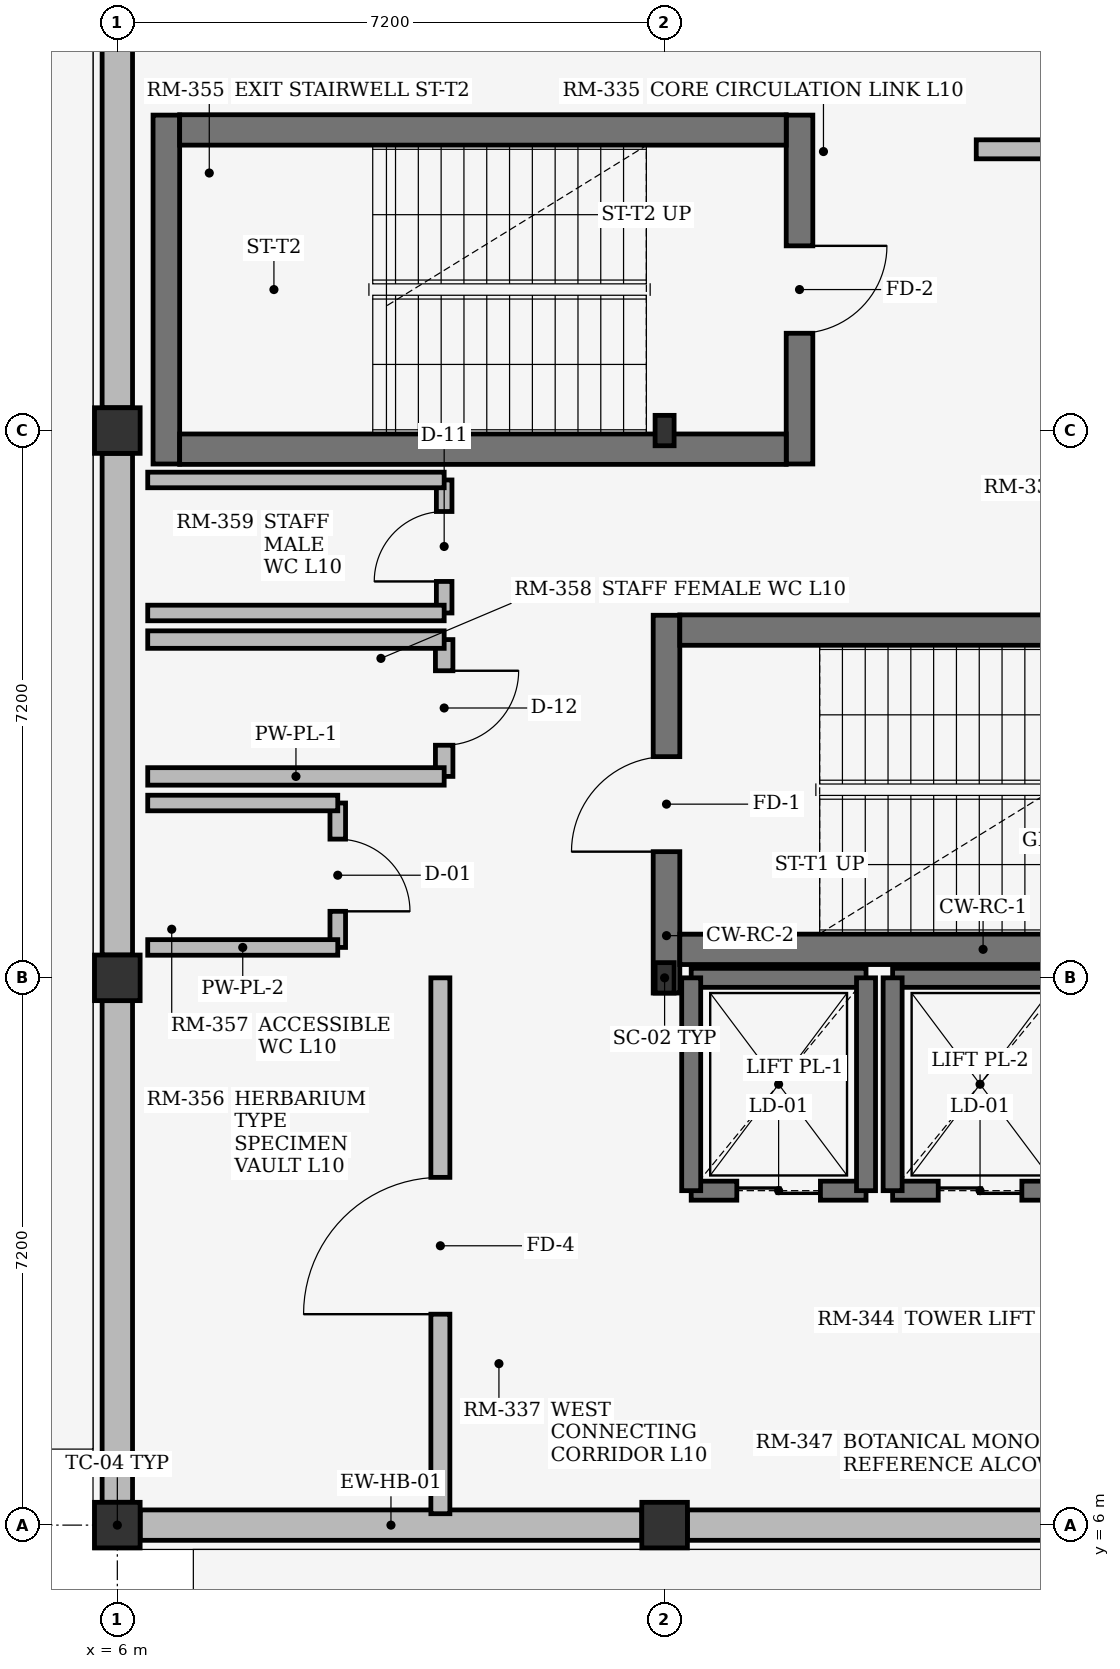
"""IFC4 building model, lengths in metres.
Left out: names, types, materials, properties, quantities, classifications, styles, units other than length and angle.
Written with IfcOpenShell. Run it as: python <this file> out.ifc"""

import sys

from ifc_helpers import new_model, si_unit, direction, frame, frame_2d, origin, origin_2d, place, context, subcontext, project, spatial, rectangle, i_section, extrude, element, fill, save


model = new_model("IFC4")
c1 = context("Model", 3, precision=1e-05, world=origin(), true_north=direction((0.0, 1.0)))
c2 = subcontext(c1, "Body", "Model", "MODEL_VIEW")
j1 = project(units=[si_unit("LENGTHUNIT", "METRE"), si_unit("PLANEANGLEUNIT", "RADIAN")], contexts=[c1])
p1 = place(None, origin())
s1 = spatial("IfcSite", under=j1, at=p1, CompositionType="ELEMENT")
p2 = place(p1, origin())
s2 = spatial("IfcBuilding", under=s1, at=p2, CompositionType="ELEMENT")
p3 = place(p2, frame((0.0, 0.0, 40.5)))
s3 = spatial("IfcBuildingStorey", under=s2, at=p3, CompositionType="ELEMENT", Elevation=40.5)
for number, where, z_axis, x_axis in (
    (1, (6.0, 6.0, 0.0), (0.0, 0.0, 1.0), (1.0, 0.0, 0.0)),
    (2, (6.0, 13.2, 0.0), (0.0, 0.0, 1.0), (1.0, 0.0, 0.0)),
    (3, (6.0, 20.4, 0.0), (0.0, 0.0, 1.0), (1.0, 0.0, 0.0)),
    (4, (13.2, 6.0, 0.0), (0.0, 0.0, 1.0), (1.0, 0.0, 0.0)),
):
    element("IfcColumn", number, at=place(p3, frame(where, z_axis=z_axis, x_axis=x_axis)), inside=s3, PredefinedType="COLUMN", context=c2, shape_type="SweptSolid", body=[
        extrude(rectangle(XDim=0.6, YDim=0.6, at=origin_2d()), origin(), (0.0, 0.0, 1.0), 3.68),
    ])
for number, where, z_axis, x_axis in (
    (5, (13.2, 13.2, 0.0), (0.0, 0.0, 1.0), (1.0, 0.0, 0.0)),
    (6, (13.2, 20.4, 0.0), (0.0, 0.0, 1.0), (1.0, 0.0, 0.0)),
):
    element("IfcColumn", number, at=place(p3, frame(where, z_axis=z_axis, x_axis=x_axis)), inside=s3, PredefinedType="COLUMN", context=c2, shape_type="SweptSolid", body=[
        extrude(i_section(OverallWidth=0.25, OverallDepth=0.4, WebThickness=0.01, FlangeThickness=0.013, at=origin_2d()), origin(), (0.0, 0.0, 1.0), 3.68),
    ])
p4 = place(p3, frame((6.3, 6.0, 0.0), z_axis=(0.0, 0.0, 1.0), x_axis=(1.0, 0.0, 0.0)))
e7 = element("IfcWall", 7, at=p4, inside=s3, PredefinedType="STANDARD", context=c2, shape_type="SweptSolid", body=[
    extrude(rectangle(XDim=6.6, YDim=0.4, at=frame_2d((3.3, 0.0))), origin(), (0.0, 0.0, 1.0), 3.16),
])
p5 = place(p3, frame((13.5, 6.0, 0.0), z_axis=(0.0, 0.0, 1.0), x_axis=(1.0, 0.0, 0.0)))
e8 = element("IfcWall", 8, at=p5, inside=s3, PredefinedType="STANDARD", context=c2, shape_type="SweptSolid", body=[
    extrude(rectangle(XDim=6.6, YDim=0.4, at=frame_2d((3.3, 0.0))), origin(), (0.0, 0.0, 1.0), 3.16),
])
p6 = place(p3, frame((6.0, 6.3, 0.0), z_axis=(0.0, 0.0, 1.0), x_axis=(0.0, 1.0, 0.0)))
e9 = element("IfcWall", 9, at=p6, inside=s3, PredefinedType="STANDARD", context=c2, shape_type="SweptSolid", body=[
    extrude(rectangle(XDim=6.6, YDim=0.4, at=frame_2d((3.3, 0.0))), origin(), (0.0, 0.0, 1.0), 3.16),
])
for number, where, z_axis, x_axis in (
    (10, (6.0, 13.5, 0.0), (0.0, 0.0, 1.0), (0.0, 1.0, 0.0)),
    (11, (6.0, 20.7, 0.0), (0.0, 0.0, 1.0), (0.0, 1.0, 0.0)),
):
    element("IfcWall", number, at=place(p3, frame(where, z_axis=z_axis, x_axis=x_axis)), inside=s3, PredefinedType="STANDARD", context=c2, shape_type="SweptSolid", body=[
        extrude(rectangle(XDim=6.6, YDim=0.4, at=frame_2d((3.3, 0.0))), origin(), (0.0, 0.0, 1.0), 3.16),
    ])
p7 = place(p3, frame((13.225, 13.0, 0.0), z_axis=(0.0, 0.0, 1.0), x_axis=(0.0, 1.0, 0.0)))
e12 = element("IfcWall", 12, at=p7, inside=s3, PredefinedType="SHEAR", context=c2, shape_type="SweptSolid", body=[
    extrude(rectangle(XDim=4.97, YDim=0.35, at=frame_2d((2.485, 0.0))), origin(), (0.0, 0.0, 1.0), 3.68),
])
p8 = place(p7, frame((1.86, 0.0, 0.0)))
e13 = element("IfcOpeningElement", 13, at=p8, cuts=e12, PredefinedType="OPENING", context=c2, shape_type="SweptSolid", body=[
    extrude(rectangle(XDim=1.25, YDim=2.2, at=frame_2d((0.625, 1.1))), frame((0.0, 0.185, 0.0), z_axis=(0.0, -1.0, 0.0), x_axis=(1.0, 0.0, 0.0)), (0.0, 0.0, 1.0), 0.37),
])
for number, where, z_axis, x_axis in (
    (14, (13.4, 13.575, 0.0), (0.0, 0.0, 1.0), (1.0, 0.0, 0.0)),
    (15, (13.4, 17.775, 0.0), (0.0, 0.0, 1.0), (1.0, 0.0, 0.0)),
):
    element("IfcWall", number, at=place(p3, frame(where, z_axis=z_axis, x_axis=x_axis)), inside=s3, PredefinedType="SHEAR", context=c2, shape_type="SweptSolid", body=[
        extrude(rectangle(XDim=7.98, YDim=0.4, at=frame_2d((3.99, 0.0))), origin(), (0.0, 0.0, 1.0), 3.68),
    ])
p9 = place(p3, frame((14.975, 24.55, 0.0), z_axis=(0.0, 0.0, 1.0), x_axis=(0.0, -1.0, 0.0)))
e16 = element("IfcWall", 16, at=p9, inside=s3, PredefinedType="SHEAR", context=c2, shape_type="SweptSolid", body=[
    extrude(rectangle(XDim=4.59, YDim=0.35, at=frame_2d((2.295, 0.0))), origin(), (0.0, 0.0, 1.0), 3.68),
])
p10 = place(p9, frame((1.72, 0.0, 0.0)))
e17 = element("IfcOpeningElement", 17, at=p10, cuts=e16, PredefinedType="OPENING", context=c2, shape_type="SweptSolid", body=[
    extrude(rectangle(XDim=1.15, YDim=2.2, at=frame_2d((0.575, 1.1))), frame((0.0, 0.185, 0.0), z_axis=(0.0, -1.0, 0.0), x_axis=(1.0, 0.0, 0.0)), (0.0, 0.0, 1.0), 0.37),
])
p11 = place(p3, frame((6.645, 24.55, 0.0), z_axis=(0.0, 0.0, 1.0), x_axis=(0.0, -1.0, 0.0)))
e18 = element("IfcWall", 18, at=p11, inside=s3, PredefinedType="SHEAR", context=c2, shape_type="SweptSolid", body=[
    extrude(rectangle(XDim=4.59, YDim=0.35, at=frame_2d((2.295, 0.0))), origin(), (0.0, 0.0, 1.0), 3.68),
])
for number, where, z_axis, x_axis in (
    (19, (14.8, 24.355, 0.0), (0.0, 0.0, 1.0), (-1.0, 0.0, 0.0)),
    (20, (14.8, 20.155, 0.0), (0.0, 0.0, 1.0), (-1.0, 0.0, 0.0)),
):
    element("IfcWall", number, at=place(p3, frame(where, z_axis=z_axis, x_axis=x_axis)), inside=s3, PredefinedType="SHEAR", context=c2, shape_type="SweptSolid", body=[
        extrude(rectangle(XDim=7.98, YDim=0.4, at=frame_2d((3.99, 0.0))), origin(), (0.0, 0.0, 1.0), 3.68),
    ])
p12 = place(p3, frame((13.55, 10.4, 0.0), z_axis=(0.0, 0.0, 1.0), x_axis=(1.0, 0.0, 0.0)))
e21 = element("IfcWall", 21, at=p12, inside=s3, PredefinedType="SHEAR", context=c2, shape_type="SweptSolid", body=[
    extrude(rectangle(XDim=2.3, YDim=0.25, at=frame_2d((1.15, 0.0))), origin(), (0.0, 0.0, 1.0), 3.68),
])
p13 = place(p12, frame((0.6, 0.0, 0.0)))
e22 = element("IfcOpeningElement", 22, at=p13, cuts=e21, PredefinedType="OPENING", context=c2, shape_type="SweptSolid", body=[
    extrude(rectangle(XDim=1.1, YDim=2.2, at=frame_2d((0.55, 1.1))), frame((0.0, 0.135, 0.0), z_axis=(0.0, -1.0, 0.0), x_axis=(1.0, 0.0, 0.0)), (0.0, 0.0, 1.0), 0.27),
])
p14 = place(p3, frame((13.55, 13.2, 0.0), z_axis=(0.0, 0.0, 1.0), x_axis=(1.0, 0.0, 0.0)))
e23 = element("IfcWall", 23, at=p14, inside=s3, PredefinedType="SHEAR", context=c2, shape_type="SweptSolid", body=[
    extrude(rectangle(XDim=2.3, YDim=0.25, at=frame_2d((1.15, 0.0))), origin(), (0.0, 0.0, 1.0), 3.68),
])
for number, where, z_axis, x_axis in (
    (24, (13.55, 10.4, 0.0), (0.0, 0.0, 1.0), (0.0, 1.0, 0.0)),
    (25, (15.85, 10.4, 0.0), (0.0, 0.0, 1.0), (0.0, 1.0, 0.0)),
):
    element("IfcWall", number, at=place(p3, frame(where, z_axis=z_axis, x_axis=x_axis)), inside=s3, PredefinedType="SHEAR", context=c2, shape_type="SweptSolid", body=[
        extrude(rectangle(XDim=2.8, YDim=0.25, at=frame_2d((1.4, 0.0))), origin(), (0.0, 0.0, 1.0), 3.68),
    ])
p15 = place(p3, frame((16.2, 10.4, 0.0), z_axis=(0.0, 0.0, 1.0), x_axis=(1.0, 0.0, 0.0)))
e26 = element("IfcWall", 26, at=p15, inside=s3, PredefinedType="SHEAR", context=c2, shape_type="SweptSolid", body=[
    extrude(rectangle(XDim=2.3, YDim=0.25, at=frame_2d((1.15, 0.0))), origin(), (0.0, 0.0, 1.0), 3.68),
])
p16 = place(p15, frame((0.6, 0.0, 0.0)))
e27 = element("IfcOpeningElement", 27, at=p16, cuts=e26, PredefinedType="OPENING", context=c2, shape_type="SweptSolid", body=[
    extrude(rectangle(XDim=1.1, YDim=2.2, at=frame_2d((0.55, 1.1))), frame((0.0, 0.135, 0.0), z_axis=(0.0, -1.0, 0.0), x_axis=(1.0, 0.0, 0.0)), (0.0, 0.0, 1.0), 0.27),
])
p17 = place(p3, frame((16.2, 13.2, 0.0), z_axis=(0.0, 0.0, 1.0), x_axis=(1.0, 0.0, 0.0)))
e28 = element("IfcWall", 28, at=p17, inside=s3, PredefinedType="SHEAR", context=c2, shape_type="SweptSolid", body=[
    extrude(rectangle(XDim=2.3, YDim=0.25, at=frame_2d((1.15, 0.0))), origin(), (0.0, 0.0, 1.0), 3.68),
])
p18 = place(p3, frame((16.2, 10.4, 0.0), z_axis=(0.0, 0.0, 1.0), x_axis=(0.0, 1.0, 0.0)))
e29 = element("IfcWall", 29, at=p18, inside=s3, PredefinedType="SHEAR", context=c2, shape_type="SweptSolid", body=[
    extrude(rectangle(XDim=2.8, YDim=0.25, at=frame_2d((1.4, 0.0))), origin(), (0.0, 0.0, 1.0), 3.68),
])
p19 = place(p3, frame((8.9, 13.6, 0.0), z_axis=(0.0, 0.0, 1.0), x_axis=(0.0, 1.0, 0.0)))
e30 = element("IfcWall", 30, at=p19, inside=s3, PredefinedType="PLUMBINGWALL", context=c2, shape_type="SweptSolid", body=[
    extrude(rectangle(XDim=1.9, YDim=0.205, at=frame_2d((0.95, 0.0))), origin(), (0.0, 0.0, 1.0), 3.66),
])
p20 = place(p19, frame((0.475, 0.0, 0.0)))
e31 = element("IfcOpeningElement", 31, at=p20, cuts=e30, PredefinedType="OPENING", context=c2, shape_type="SweptSolid", body=[
    extrude(rectangle(XDim=0.95, YDim=2.15, at=frame_2d((0.475, 1.075))), frame((0.0, 0.113, 0.0), z_axis=(0.0, -1.0, 0.0), x_axis=(1.0, 0.0, 0.0)), (0.0, 0.0, 1.0), 0.225),
])
for number, where, z_axis, x_axis in (
    (32, (6.4, 13.6, 0.0), (0.0, 0.0, 1.0), (1.0, 0.0, 0.0)),
    (33, (6.4, 15.5, 0.0), (0.0, 0.0, 1.0), (1.0, 0.0, 0.0)),
):
    element("IfcWall", number, at=place(p3, frame(where, z_axis=z_axis, x_axis=x_axis)), inside=s3, PredefinedType="PLUMBINGWALL", context=c2, shape_type="SweptSolid", body=[
        extrude(rectangle(XDim=2.5, YDim=0.205, at=frame_2d((1.25, 0.0))), origin(), (0.0, 0.0, 1.0), 3.66),
    ])
p21 = place(p3, frame((10.3, 15.85, 0.0), z_axis=(0.0, 0.0, 1.0), x_axis=(0.0, 1.0, 0.0)))
e34 = element("IfcWall", 34, at=p21, inside=s3, PredefinedType="PLUMBINGWALL", context=c2, shape_type="SweptSolid", body=[
    extrude(rectangle(XDim=1.8, YDim=0.23, at=frame_2d((0.9, 0.0))), origin(), (0.0, 0.0, 1.0), 3.66),
])
p22 = place(p21, frame((0.41, 0.0, 0.0)))
e35 = element("IfcOpeningElement", 35, at=p22, cuts=e34, PredefinedType="OPENING", context=c2, shape_type="SweptSolid", body=[
    extrude(rectangle(XDim=0.98, YDim=2.1, at=frame_2d((0.49, 1.05))), frame((0.0, 0.125, 0.0), z_axis=(0.0, -1.0, 0.0), x_axis=(1.0, 0.0, 0.0)), (0.0, 0.0, 1.0), 0.25),
])
for number, where, z_axis, x_axis in (
    (36, (6.4, 15.85, 0.0), (0.0, 0.0, 1.0), (1.0, 0.0, 0.0)),
    (37, (6.4, 17.65, 0.0), (0.0, 0.0, 1.0), (1.0, 0.0, 0.0)),
):
    element("IfcWall", number, at=place(p3, frame(where, z_axis=z_axis, x_axis=x_axis)), inside=s3, PredefinedType="PLUMBINGWALL", context=c2, shape_type="SweptSolid", body=[
        extrude(rectangle(XDim=3.9, YDim=0.23, at=frame_2d((1.95, 0.0))), origin(), (0.0, 0.0, 1.0), 3.66),
    ])
p23 = place(p3, frame((10.3, 18.0, 0.0), z_axis=(0.0, 0.0, 1.0), x_axis=(0.0, 1.0, 0.0)))
e38 = element("IfcWall", 38, at=p23, inside=s3, PredefinedType="PLUMBINGWALL", context=c2, shape_type="SweptSolid", body=[
    extrude(rectangle(XDim=1.75, YDim=0.205, at=frame_2d((0.875, 0.0))), origin(), (0.0, 0.0, 1.0), 3.66),
])
p24 = place(p23, frame((0.415, 0.0, 0.0)))
e39 = element("IfcOpeningElement", 39, at=p24, cuts=e38, PredefinedType="OPENING", context=c2, shape_type="SweptSolid", body=[
    extrude(rectangle(XDim=0.92, YDim=2.1, at=frame_2d((0.46, 1.05))), frame((0.0, 0.113, 0.0), z_axis=(0.0, -1.0, 0.0), x_axis=(1.0, 0.0, 0.0)), (0.0, 0.0, 1.0), 0.225),
])
for number, where, z_axis, x_axis in (
    (40, (6.4, 18.0, 0.0), (0.0, 0.0, 1.0), (1.0, 0.0, 0.0)),
    (41, (6.4, 19.75, 0.0), (0.0, 0.0, 1.0), (1.0, 0.0, 0.0)),
):
    element("IfcWall", number, at=place(p3, frame(where, z_axis=z_axis, x_axis=x_axis)), inside=s3, PredefinedType="PLUMBINGWALL", context=c2, shape_type="SweptSolid", body=[
        extrude(rectangle(XDim=3.9, YDim=0.205, at=frame_2d((1.95, 0.0))), origin(), (0.0, 0.0, 1.0), 3.66),
    ])
p25 = place(p3, frame((17.3, 24.1, 0.0), z_axis=(0.0, 0.0, 1.0), x_axis=(1.0, 0.0, 0.0)))
e42 = element("IfcWall", 42, at=p25, inside=s3, PredefinedType="SOLIDWALL", context=c2, shape_type="SweptSolid", body=[
    extrude(rectangle(XDim=4.0, YDim=0.25, at=frame_2d((2.0, 0.0))), origin(), (0.0, 0.0, 1.0), 3.66),
])
p26 = place(p25, frame((1.1, 0.0, 0.0)))
e43 = element("IfcOpeningElement", 43, at=p26, cuts=e42, PredefinedType="OPENING", context=c2, shape_type="SweptSolid", body=[
    extrude(rectangle(XDim=1.8, YDim=2.25, at=frame_2d((0.9, 1.125))), frame((0.0, 0.135, 0.0), z_axis=(0.0, -1.0, 0.0), x_axis=(1.0, 0.0, 0.0)), (0.0, 0.0, 1.0), 0.27),
])
p27 = place(p3, frame((10.25, 6.15, 0.0), z_axis=(0.0, 0.0, 1.0), x_axis=(0.0, 1.0, 0.0)))
e44 = element("IfcWall", 44, at=p27, inside=s3, PredefinedType="SOLIDWALL", context=c2, shape_type="SweptSolid", body=[
    extrude(rectangle(XDim=7.05, YDim=0.25, at=frame_2d((3.525, 0.0))), origin(), (0.0, 0.0, 1.0), 3.66),
])
p28 = place(p27, frame((2.625, 0.0, 0.0)))
e45 = element("IfcOpeningElement", 45, at=p28, cuts=e44, PredefinedType="OPENING", context=c2, shape_type="SweptSolid", body=[
    extrude(rectangle(XDim=1.8, YDim=2.25, at=frame_2d((0.9, 1.125))), frame((0.0, 0.135, 0.0), z_axis=(0.0, -1.0, 0.0), x_axis=(1.0, 0.0, 0.0)), (0.0, 0.0, 1.0), 0.27),
])
p29 = place(p8, origin())
e46 = element("IfcDoor", 46, at=p29, inside=s3, OperationType="SINGLE_SWING_LEFT", PredefinedType="DOOR", context=c2, shape_type="SweptSolid", body=[
    extrude(rectangle(XDim=1.25, YDim=2.2, at=frame_2d((0.625, 1.1))), frame((0.0, 0.025, 0.0), z_axis=(0.0, -1.0, 0.0), x_axis=(1.0, 0.0, 0.0)), (0.0, 0.0, 1.0), 0.05),
])
fill(e13, e46)
p30 = place(p10, origin())
e47 = element("IfcDoor", 47, at=p30, inside=s3, OperationType="SINGLE_SWING_LEFT", PredefinedType="DOOR", context=c2, shape_type="SweptSolid", body=[
    extrude(rectangle(XDim=1.15, YDim=2.2, at=frame_2d((0.575, 1.1))), frame((0.0, 0.025, 0.0), z_axis=(0.0, -1.0, 0.0), x_axis=(1.0, 0.0, 0.0)), (0.0, 0.0, 1.0), 0.05),
])
fill(e17, e47)
p31 = place(p13, origin())
e48 = element("IfcDoor", 48, at=p31, inside=s3, OperationType="DOUBLE_DOOR_SLIDING", PredefinedType="DOOR", context=c2, shape_type="SweptSolid", body=[
    extrude(rectangle(XDim=1.1, YDim=2.2, at=frame_2d((0.55, 1.1))), frame((0.0, 0.025, 0.0), z_axis=(0.0, -1.0, 0.0), x_axis=(1.0, 0.0, 0.0)), (0.0, 0.0, 1.0), 0.05),
])
fill(e22, e48)
p32 = place(p16, origin())
e49 = element("IfcDoor", 49, at=p32, inside=s3, OperationType="DOUBLE_DOOR_SLIDING", PredefinedType="DOOR", context=c2, shape_type="SweptSolid", body=[
    extrude(rectangle(XDim=1.1, YDim=2.2, at=frame_2d((0.55, 1.1))), frame((0.0, 0.025, 0.0), z_axis=(0.0, -1.0, 0.0), x_axis=(1.0, 0.0, 0.0)), (0.0, 0.0, 1.0), 0.05),
])
fill(e27, e49)
p33 = place(p20, frame((0.95, 0.0, 0.0), z_axis=(0.0, 0.0, 1.0), x_axis=(-1.0, 0.0, 0.0)))
e50 = element("IfcDoor", 50, at=p33, inside=s3, OperationType="SINGLE_SWING_LEFT", PredefinedType="DOOR", context=c2, shape_type="SweptSolid", body=[
    extrude(rectangle(XDim=0.95, YDim=2.15, at=frame_2d((0.475, 1.075))), frame((0.0, 0.025, 0.0), z_axis=(0.0, -1.0, 0.0), x_axis=(1.0, 0.0, 0.0)), (0.0, 0.0, 1.0), 0.05),
])
fill(e31, e50)
p34 = place(p22, origin())
e51 = element("IfcDoor", 51, at=p34, inside=s3, OperationType="SINGLE_SWING_RIGHT", PredefinedType="DOOR", context=c2, shape_type="SweptSolid", body=[
    extrude(rectangle(XDim=0.98, YDim=2.1, at=frame_2d((0.49, 1.05))), frame((0.0, 0.025, 0.0), z_axis=(0.0, -1.0, 0.0), x_axis=(1.0, 0.0, 0.0)), (0.0, 0.0, 1.0), 0.05),
])
fill(e35, e51)
p35 = place(p24, origin())
e52 = element("IfcDoor", 52, at=p35, inside=s3, OperationType="SINGLE_SWING_LEFT", PredefinedType="DOOR", context=c2, shape_type="SweptSolid", body=[
    extrude(rectangle(XDim=0.92, YDim=2.1, at=frame_2d((0.46, 1.05))), frame((0.0, 0.025, 0.0), z_axis=(0.0, -1.0, 0.0), x_axis=(1.0, 0.0, 0.0)), (0.0, 0.0, 1.0), 0.05),
])
fill(e39, e52)
p36 = place(p28, origin())
e53 = element("IfcDoor", 53, at=p36, inside=s3, OperationType="DOUBLE_DOOR_SINGLE_SWING", PredefinedType="DOOR", context=c2, shape_type="SweptSolid", body=[
    extrude(rectangle(XDim=1.8, YDim=2.25, at=frame_2d((0.9, 1.125))), frame((0.0, 0.025, 0.0), z_axis=(0.0, -1.0, 0.0), x_axis=(1.0, 0.0, 0.0)), (0.0, 0.0, 1.0), 0.05),
])
fill(e45, e53)
save(model, sys.argv[1])
